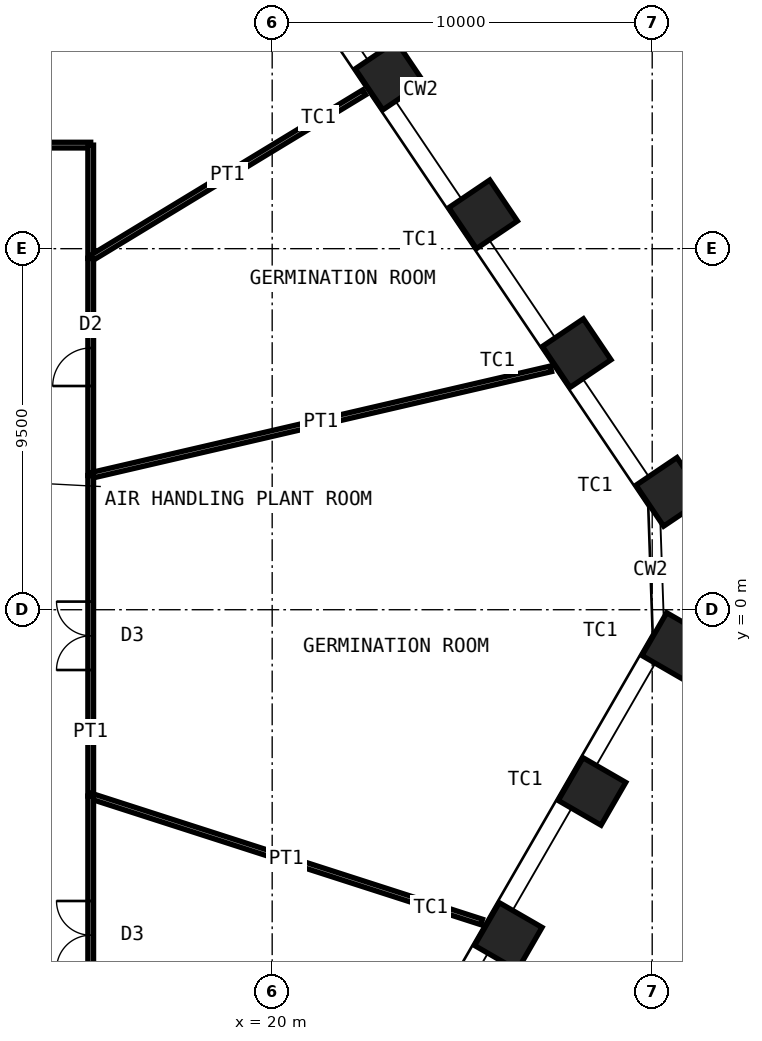
"""IFC4 building model, lengths in metres.
Left out: names, types, materials, properties, quantities, classifications, styles, units other than length and angle.
Written with IfcOpenShell. Run it as: python <this file> out.ifc"""

import sys

from ifc_helpers import new_model, si_unit, direction, frame, frame_2d, origin, origin_2d, place, context, subcontext, project, spatial, rectangle, hollow_rectangle, extrude, element, fill, save


model = new_model("IFC4")
c1 = context("Model", 3, precision=1e-05, world=origin(), true_north=direction((0.0, 1.0)))
c2 = subcontext(c1, "Body", "Model", "MODEL_VIEW")
j1 = project(units=[si_unit("LENGTHUNIT", "METRE"), si_unit("PLANEANGLEUNIT", "RADIAN")], contexts=[c1])
p1 = place(None, origin())
s1 = spatial("IfcSite", under=j1, at=p1, CompositionType="ELEMENT")
p2 = place(p1, origin())
s2 = spatial("IfcBuilding", under=s1, at=p2, CompositionType="ELEMENT")
p3 = place(p2, frame((0.0, 0.0, 32.0)))
s3 = spatial("IfcBuildingStorey", under=s2, at=p3, CompositionType="ELEMENT", Elevation=32.0)
for number, where, z_axis, x_axis in (
    (1, (23.087, 14.056, 0.0), (0.0, 0.0, 1.0), (-0.559, 0.829, 0.0)),
    (2, (25.55, 10.404, 0.0), (0.0, 0.0, 1.0), (-0.559, 0.829, 0.0)),
    (3, (28.013, 6.752, 0.0), (0.0, 0.0, 1.0), (-0.559, 0.829, 0.0)),
    (4, (30.476, 3.101, 0.0), (0.0, 0.0, 1.0), (-0.559, 0.829, 0.0)),
    (5, (30.618, -0.967, 0.0), (0.0, 0.0, 1.0), (0.5, 0.866, 0.0)),
    (6, (28.416, -4.782, 0.0), (0.0, 0.0, 1.0), (0.5, 0.866, 0.0)),
    (7, (26.214, -8.596, 0.0), (0.0, 0.0, 1.0), (0.5, 0.866, 0.0)),
):
    element("IfcColumn", number, at=place(p3, frame(where, z_axis=z_axis, x_axis=x_axis)), inside=s3, PredefinedType="COLUMN", context=c2, shape_type="SweptSolid", body=[
        extrude(hollow_rectangle(XDim=1.3, YDim=1.3, WallThickness=0.1, at=origin_2d()), origin(), (0.0, 0.0, 1.0), 5.0),
    ])
p4 = place(p3, frame((3.51, 12.225, 0.0), z_axis=(0.0, 0.0, 1.0), x_axis=(1.0, 0.0, 0.0)))
e8 = element("IfcWall", 8, at=p4, inside=s3, PredefinedType="PARTITIONING", context=c2, shape_type="SweptSolid", body=[
    extrude(rectangle(XDim=11.715, YDim=0.15, at=frame_2d((5.857, 0.0))), origin(), (0.0, 0.0, 1.0), 4.8),
])
p5 = place(p4, frame((4.958, 0.0, 0.0)))
e9 = element("IfcOpeningElement", 9, at=p5, cuts=e8, PredefinedType="OPENING", context=c2, shape_type="SweptSolid", body=[
    extrude(rectangle(XDim=1.8, YDim=2.4, at=frame_2d((0.9, 1.2))), frame((0.0, 0.085, 0.0), z_axis=(0.0, -1.0, 0.0), x_axis=(1.0, 0.0, 0.0)), (0.0, 0.0, 1.0), 0.17),
])
p6 = place(p3, frame((15.225, 12.225, 0.0), z_axis=(0.0, 0.0, 1.0), x_axis=(0.0, -1.0, 0.0)))
e10 = element("IfcWall", 10, at=p6, inside=s3, PredefinedType="PARTITIONING", context=c2, shape_type="SweptSolid", body=[
    extrude(rectangle(XDim=2.982, YDim=0.15, at=frame_2d((1.491, 0.0))), origin(), (0.0, 0.0, 1.0), 4.8),
])
p7 = place(p3, frame((22.421, 13.612, 0.0), z_axis=(0.0, 0.0, 1.0), x_axis=(-0.854789353023, -0.518975107263, 0.0)))
e11 = element("IfcWall", 11, at=p7, inside=s3, PredefinedType="PARTITIONING", context=c2, shape_type="SweptSolid", body=[
    extrude(rectangle(XDim=8.419, YDim=0.15, at=frame_2d((4.209, 0.0))), origin(), (0.0, 0.0, 1.0), 3.7),
])
p8 = place(p3, frame((15.225, 9.243, 0.0), z_axis=(0.0, 0.0, 1.0), x_axis=(0.0, -1.0, 0.0)))
e12 = element("IfcWall", 12, at=p8, inside=s3, PredefinedType="PARTITIONING", context=c2, shape_type="SweptSolid", body=[
    extrude(rectangle(XDim=5.713, YDim=0.15, at=frame_2d((2.856, 0.0))), origin(), (0.0, 0.0, 1.0), 4.8),
])
p9 = place(p8, frame((2.356, 0.0, 0.0)))
e13 = element("IfcOpeningElement", 13, at=p9, cuts=e12, PredefinedType="OPENING", context=c2, shape_type="SweptSolid", body=[
    extrude(rectangle(XDim=1.0, YDim=2.4, at=frame_2d((0.5, 1.2))), frame((0.0, 0.085, 0.0), z_axis=(0.0, -1.0, 0.0), x_axis=(1.0, 0.0, 0.0)), (0.0, 0.0, 1.0), 0.17),
])
p10 = place(p3, frame((27.336, 6.338, 0.0), z_axis=(0.0, 0.0, 1.0), x_axis=(-0.974155334075, -0.225879138243, 0.0)))
e14 = element("IfcWall", 14, at=p10, inside=s3, PredefinedType="PARTITIONING", context=c2, shape_type="SweptSolid", body=[
    extrude(rectangle(XDim=12.432, YDim=0.15, at=frame_2d((6.216, 0.0))), origin(), (0.0, 0.0, 1.0), 3.7),
])
p11 = place(p3, frame((15.225, 3.53, 0.0), z_axis=(0.0, 0.0, 1.0), x_axis=(0.0, -1.0, 0.0)))
e15 = element("IfcWall", 15, at=p11, inside=s3, PredefinedType="PARTITIONING", context=c2, shape_type="SweptSolid", body=[
    extrude(rectangle(XDim=8.433, YDim=0.15, at=frame_2d((4.217, 0.0))), origin(), (0.0, 0.0, 1.0), 4.8),
])
p12 = place(p11, frame((3.317, 0.0, 0.0)))
e16 = element("IfcOpeningElement", 16, at=p12, cuts=e15, PredefinedType="OPENING", context=c2, shape_type="SweptSolid", body=[
    extrude(rectangle(XDim=1.8, YDim=2.4, at=frame_2d((0.9, 1.2))), frame((0.0, 0.085, 0.0), z_axis=(0.0, -1.0, 0.0), x_axis=(1.0, 0.0, 0.0)), (0.0, 0.0, 1.0), 0.17),
])
p13 = place(p3, frame((25.512, -8.216, 0.0), z_axis=(0.0, 0.0, 1.0), x_axis=(-0.95186413264, 0.306520265225, 0.0)))
e17 = element("IfcWall", 17, at=p13, inside=s3, PredefinedType="PARTITIONING", context=c2, shape_type="SweptSolid", body=[
    extrude(rectangle(XDim=10.808, YDim=0.15, at=frame_2d((5.404, 0.0))), origin(), (0.0, 0.0, 1.0), 3.7),
])
p14 = place(p3, frame((15.225, -4.903, 0.0), z_axis=(0.0, 0.0, 1.0), x_axis=(0.0, -1.0, 0.0)))
e18 = element("IfcWall", 18, at=p14, inside=s3, PredefinedType="PARTITIONING", context=c2, shape_type="SweptSolid", body=[
    extrude(rectangle(XDim=7.322, YDim=0.15, at=frame_2d((3.661, 0.0))), origin(), (0.0, 0.0, 1.0), 4.8),
])
p15 = place(p14, frame((2.761, 0.0, 0.0)))
e19 = element("IfcOpeningElement", 19, at=p15, cuts=e18, PredefinedType="OPENING", context=c2, shape_type="SweptSolid", body=[
    extrude(rectangle(XDim=1.8, YDim=2.4, at=frame_2d((0.9, 1.2))), frame((0.0, 0.085, 0.0), z_axis=(0.0, -1.0, 0.0), x_axis=(1.0, 0.0, 0.0)), (0.0, 0.0, 1.0), 0.17),
])
p16 = place(p9, origin())
e20 = element("IfcDoor", 20, at=p16, inside=s3, OperationType="SINGLE_SWING_RIGHT", PredefinedType="DOOR", context=c2, shape_type="SweptSolid", body=[
    extrude(rectangle(XDim=1.0, YDim=2.4, at=frame_2d((0.5, 1.2))), frame((0.0, 0.025, 0.0), z_axis=(0.0, -1.0, 0.0), x_axis=(1.0, 0.0, 0.0)), (0.0, 0.0, 1.0), 0.05),
])
fill(e13, e20)
p17 = place(p12, origin())
e21 = element("IfcDoor", 21, at=p17, inside=s3, OperationType="DOUBLE_DOOR_DOUBLE_SWING", PredefinedType="DOOR", context=c2, shape_type="SweptSolid", body=[
    extrude(rectangle(XDim=1.8, YDim=2.4, at=frame_2d((0.9, 1.2))), frame((0.0, 0.025, 0.0), z_axis=(0.0, -1.0, 0.0), x_axis=(1.0, 0.0, 0.0)), (0.0, 0.0, 1.0), 0.05),
])
fill(e16, e21)
p18 = place(p15, origin())
e22 = element("IfcDoor", 22, at=p18, inside=s3, OperationType="DOUBLE_DOOR_DOUBLE_SWING", PredefinedType="DOOR", context=c2, shape_type="SweptSolid", body=[
    extrude(rectangle(XDim=1.8, YDim=2.4, at=frame_2d((0.9, 1.2))), frame((0.0, 0.025, 0.0), z_axis=(0.0, -1.0, 0.0), x_axis=(1.0, 0.0, 0.0)), (0.0, 0.0, 1.0), 0.05),
])
fill(e19, e22)
save(model, sys.argv[1])
